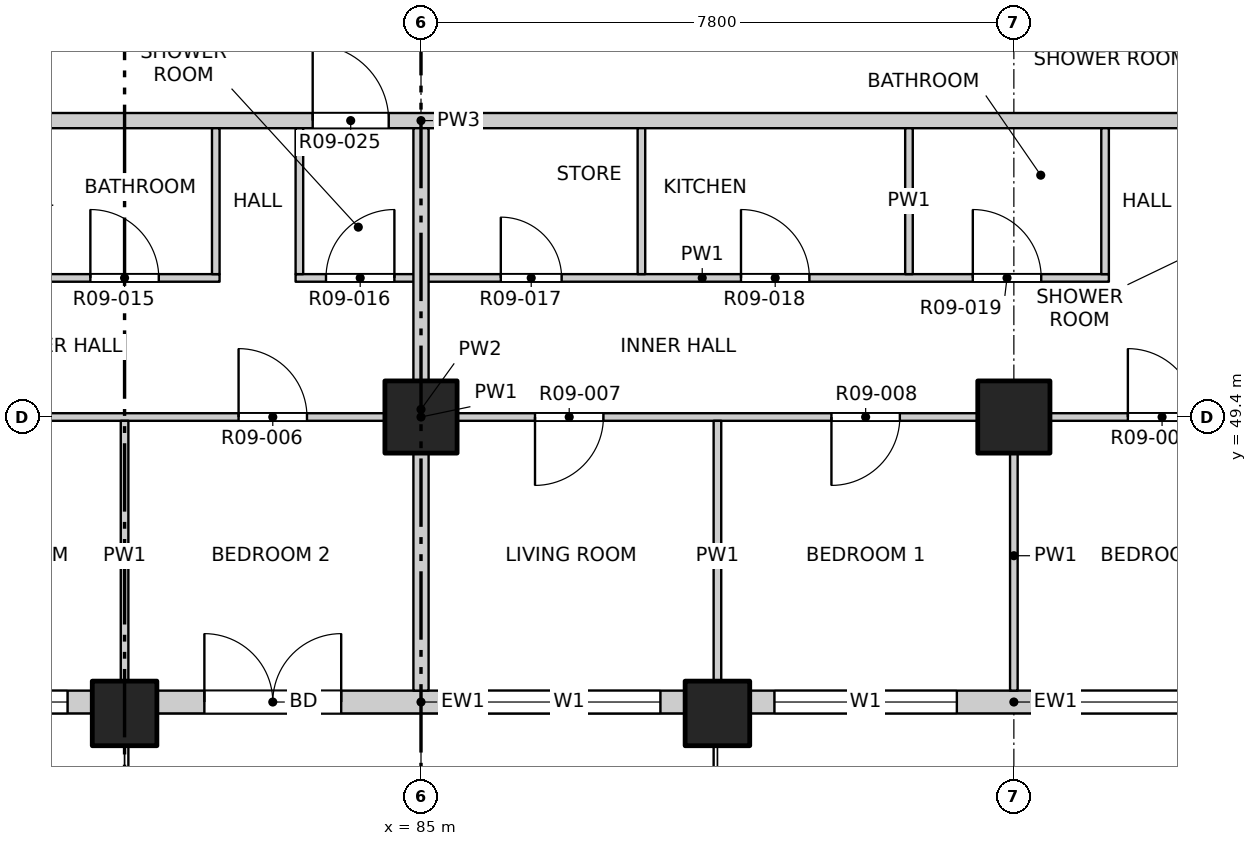
"""IFC4 building model, lengths in metres.
Left out: names, types, materials, properties, quantities, classifications, styles, units other than length and angle.
Written with IfcOpenShell. Run it as: python <this file> out.ifc"""

import sys

from ifc_helpers import new_model, si_unit, direction, frame, frame_2d, origin, origin_2d, place, context, subcontext, project, spatial, rectangle, extrude, element, fill, save


model = new_model("IFC4")
c1 = context("Model", 3, precision=1e-05, world=origin(), true_north=direction((0.0, 1.0)))
c2 = subcontext(c1, "Body", "Model", "MODEL_VIEW")
j1 = project(units=[si_unit("LENGTHUNIT", "METRE"), si_unit("PLANEANGLEUNIT", "RADIAN")], contexts=[c1])
p1 = place(None, origin())
s1 = spatial("IfcSite", under=j1, at=p1, CompositionType="ELEMENT")
p2 = place(p1, origin())
s2 = spatial("IfcBuilding", under=s1, at=p2, CompositionType="ELEMENT")
p3 = place(p2, frame((0.0, 0.0, 110.1)))
s3 = spatial("IfcBuildingStorey", under=s2, at=p3, CompositionType="ELEMENT", Elevation=110.1)
for number, where, z_axis, x_axis in (
    (1, (81.1, 45.5, -0.25), (0.0, 0.0, 1.0), (1.0, 0.0, 0.0)),
    (2, (88.9, 45.5, -0.25), (0.0, 0.0, 1.0), (1.0, 0.0, 0.0)),
):
    element("IfcColumn", number, at=place(p3, frame(where, z_axis=z_axis, x_axis=x_axis)), inside=s3, PredefinedType="COLUMN", context=c2, shape_type="SweptSolid", body=[
        extrude(rectangle(XDim=0.85, YDim=0.85, at=origin_2d()), origin(), (0.0, 0.0, 1.0), 3.4),
    ])
for number, where, z_axis, x_axis in (
    (3, (85.0, 49.4, -0.25), (0.0, 0.0, 1.0), (1.0, 0.0, 0.0)),
    (4, (92.8, 49.4, -0.25), (0.0, 0.0, 1.0), (1.0, 0.0, 0.0)),
):
    element("IfcColumn", number, at=place(p3, frame(where, z_axis=z_axis, x_axis=x_axis)), inside=s3, PredefinedType="COLUMN", context=c2, shape_type="SweptSolid", body=[
        extrude(rectangle(XDim=0.95, YDim=0.95, at=origin_2d()), origin(), (0.0, 0.0, 1.0), 3.4),
    ])
p4 = place(p3, frame((73.725, 45.65, 0.0), z_axis=(0.0, 0.0, 1.0), x_axis=(1.0, 0.0, 0.0)))
e5 = element("IfcWall", 5, at=p4, inside=s3, PredefinedType="SOLIDWALL", context=c2, shape_type="SweptSolid", body=[
    extrude(rectangle(XDim=6.95, YDim=0.3, at=frame_2d((3.475, 0.0))), origin(), (0.0, 0.0, 1.0), 2.7),
])
p5 = place(p4, frame((0.325, 0.0, 0.9)))
e6 = element("IfcOpeningElement", 6, at=p5, cuts=e5, PredefinedType="OPENING", context=c2, shape_type="SweptSolid", body=[
    extrude(rectangle(XDim=2.4, YDim=1.8, at=frame_2d((1.2, 0.9))), frame((0.0, 0.16, 0.0), z_axis=(0.0, -1.0, 0.0), x_axis=(1.0, 0.0, 0.0)), (0.0, 0.0, 1.0), 0.32),
])
p6 = place(p4, frame((4.225, 0.0, 0.9)))
e7 = element("IfcOpeningElement", 7, at=p6, cuts=e5, PredefinedType="OPENING", context=c2, shape_type="SweptSolid", body=[
    extrude(rectangle(XDim=2.4, YDim=1.8, at=frame_2d((1.2, 0.9))), frame((0.0, 0.16, 0.0), z_axis=(0.0, -1.0, 0.0), x_axis=(1.0, 0.0, 0.0)), (0.0, 0.0, 1.0), 0.32),
])
p7 = place(p3, frame((81.525, 45.65, 0.0), z_axis=(0.0, 0.0, 1.0), x_axis=(1.0, 0.0, 0.0)))
e8 = element("IfcWall", 8, at=p7, inside=s3, PredefinedType="SOLIDWALL", context=c2, shape_type="SweptSolid", body=[
    extrude(rectangle(XDim=6.95, YDim=0.3, at=frame_2d((3.475, 0.0))), origin(), (0.0, 0.0, 1.0), 2.7),
])
p8 = place(p7, frame((0.625, 0.0, 0.0)))
e9 = element("IfcOpeningElement", 9, at=p8, cuts=e8, PredefinedType="OPENING", context=c2, shape_type="SweptSolid", body=[
    extrude(rectangle(XDim=1.8, YDim=2.4, at=frame_2d((0.9, 1.2))), frame((0.0, 0.16, 0.0), z_axis=(0.0, -1.0, 0.0), x_axis=(1.0, 0.0, 0.0)), (0.0, 0.0, 1.0), 0.32),
])
p9 = place(p7, frame((4.225, 0.0, 0.9)))
e10 = element("IfcOpeningElement", 10, at=p9, cuts=e8, PredefinedType="OPENING", context=c2, shape_type="SweptSolid", body=[
    extrude(rectangle(XDim=2.4, YDim=1.8, at=frame_2d((1.2, 0.9))), frame((0.0, 0.16, 0.0), z_axis=(0.0, -1.0, 0.0), x_axis=(1.0, 0.0, 0.0)), (0.0, 0.0, 1.0), 0.32),
])
p10 = place(p3, frame((89.325, 45.65, 0.0), z_axis=(0.0, 0.0, 1.0), x_axis=(1.0, 0.0, 0.0)))
e11 = element("IfcWall", 11, at=p10, inside=s3, PredefinedType="SOLIDWALL", context=c2, shape_type="SweptSolid", body=[
    extrude(rectangle(XDim=6.95, YDim=0.3, at=frame_2d((3.475, 0.0))), origin(), (0.0, 0.0, 1.0), 2.7),
])
p11 = place(p10, frame((0.325, 0.0, 0.9)))
e12 = element("IfcOpeningElement", 12, at=p11, cuts=e11, PredefinedType="OPENING", context=c2, shape_type="SweptSolid", body=[
    extrude(rectangle(XDim=2.4, YDim=1.8, at=frame_2d((1.2, 0.9))), frame((0.0, 0.16, 0.0), z_axis=(0.0, -1.0, 0.0), x_axis=(1.0, 0.0, 0.0)), (0.0, 0.0, 1.0), 0.32),
])
p12 = place(p10, frame((4.225, 0.0, 0.9)))
e13 = element("IfcOpeningElement", 13, at=p12, cuts=e11, PredefinedType="OPENING", context=c2, shape_type="SweptSolid", body=[
    extrude(rectangle(XDim=2.4, YDim=1.8, at=frame_2d((1.2, 0.9))), frame((0.0, 0.16, 0.0), z_axis=(0.0, -1.0, 0.0), x_axis=(1.0, 0.0, 0.0)), (0.0, 0.0, 1.0), 0.32),
])
p13 = place(p3, frame((65.8, 49.4, 0.0), z_axis=(0.0, 0.0, 1.0), x_axis=(1.0, 0.0, 0.0)))
e14 = element("IfcWall", 14, at=p13, inside=s3, PredefinedType="PARTITIONING", context=c2, shape_type="SweptSolid", body=[
    extrude(rectangle(XDim=38.4, YDim=0.1, at=frame_2d((19.2, 0.0))), origin(), (0.0, 0.0, 1.0), 3.15),
])
p14 = place(p13, frame((4.19, 0.0, 0.0)))
e15 = element("IfcOpeningElement", 15, at=p14, cuts=e14, PredefinedType="OPENING", context=c2, shape_type="SweptSolid", body=[
    extrude(rectangle(XDim=0.9, YDim=2.1, at=frame_2d((0.45, 1.05))), frame((0.0, 0.06, 0.0), z_axis=(0.0, -1.0, 0.0), x_axis=(1.0, 0.0, 0.0)), (0.0, 0.0, 1.0), 0.12),
])
p15 = place(p13, frame((9.0, 0.0, 0.0)))
e16 = element("IfcOpeningElement", 16, at=p15, cuts=e14, PredefinedType="OPENING", context=c2, shape_type="SweptSolid", body=[
    extrude(rectangle(XDim=0.9, YDim=2.1, at=frame_2d((0.45, 1.05))), frame((0.0, 0.06, 0.0), z_axis=(0.0, -1.0, 0.0), x_axis=(1.0, 0.0, 0.0)), (0.0, 0.0, 1.0), 0.12),
])
p16 = place(p13, frame((12.9, 0.0, 0.0)))
e17 = element("IfcOpeningElement", 17, at=p16, cuts=e14, PredefinedType="OPENING", context=c2, shape_type="SweptSolid", body=[
    extrude(rectangle(XDim=0.9, YDim=2.1, at=frame_2d((0.45, 1.05))), frame((0.0, 0.06, 0.0), z_axis=(0.0, -1.0, 0.0), x_axis=(1.0, 0.0, 0.0)), (0.0, 0.0, 1.0), 0.12),
])
p17 = place(p13, frame((16.8, 0.0, 0.0)))
e18 = element("IfcOpeningElement", 18, at=p17, cuts=e14, PredefinedType="OPENING", context=c2, shape_type="SweptSolid", body=[
    extrude(rectangle(XDim=0.9, YDim=2.1, at=frame_2d((0.45, 1.05))), frame((0.0, 0.06, 0.0), z_axis=(0.0, -1.0, 0.0), x_axis=(1.0, 0.0, 0.0)), (0.0, 0.0, 1.0), 0.12),
])
p18 = place(p13, frame((20.7, 0.0, 0.0)))
e19 = element("IfcOpeningElement", 19, at=p18, cuts=e14, PredefinedType="OPENING", context=c2, shape_type="SweptSolid", body=[
    extrude(rectangle(XDim=0.9, YDim=2.1, at=frame_2d((0.45, 1.05))), frame((0.0, 0.06, 0.0), z_axis=(0.0, -1.0, 0.0), x_axis=(1.0, 0.0, 0.0)), (0.0, 0.0, 1.0), 0.12),
])
p19 = place(p13, frame((24.6, 0.0, 0.0)))
e20 = element("IfcOpeningElement", 20, at=p19, cuts=e14, PredefinedType="OPENING", context=c2, shape_type="SweptSolid", body=[
    extrude(rectangle(XDim=0.9, YDim=2.1, at=frame_2d((0.45, 1.05))), frame((0.0, 0.06, 0.0), z_axis=(0.0, -1.0, 0.0), x_axis=(1.0, 0.0, 0.0)), (0.0, 0.0, 1.0), 0.12),
])
p20 = place(p13, frame((28.5, 0.0, 0.0)))
e21 = element("IfcOpeningElement", 21, at=p20, cuts=e14, PredefinedType="OPENING", context=c2, shape_type="SweptSolid", body=[
    extrude(rectangle(XDim=0.9, YDim=2.1, at=frame_2d((0.45, 1.05))), frame((0.0, 0.06, 0.0), z_axis=(0.0, -1.0, 0.0), x_axis=(1.0, 0.0, 0.0)), (0.0, 0.0, 1.0), 0.12),
])
p21 = place(p13, frame((33.31, 0.0, 0.0)))
e22 = element("IfcOpeningElement", 22, at=p21, cuts=e14, PredefinedType="OPENING", context=c2, shape_type="SweptSolid", body=[
    extrude(rectangle(XDim=0.9, YDim=2.1, at=frame_2d((0.45, 1.05))), frame((0.0, 0.06, 0.0), z_axis=(0.0, -1.0, 0.0), x_axis=(1.0, 0.0, 0.0)), (0.0, 0.0, 1.0), 0.12),
])
p22 = place(p3, frame((73.2, 51.23, 0.0), z_axis=(0.0, 0.0, 1.0), x_axis=(1.0, 0.0, 0.0)))
e23 = element("IfcWall", 23, at=p22, inside=s3, PredefinedType="PARTITIONING", context=c2, shape_type="SweptSolid", body=[
    extrude(rectangle(XDim=9.15, YDim=0.1, at=frame_2d((4.575, 0.0))), origin(), (0.0, 0.0, 1.0), 3.15),
])
p23 = place(p22, frame((1.41, 0.0, 0.0)))
e24 = element("IfcOpeningElement", 24, at=p23, cuts=e23, PredefinedType="OPENING", context=c2, shape_type="SweptSolid", body=[
    extrude(rectangle(XDim=0.9, YDim=2.1, at=frame_2d((0.45, 1.05))), frame((0.0, 0.06, 0.0), z_axis=(0.0, -1.0, 0.0), x_axis=(1.0, 0.0, 0.0)), (0.0, 0.0, 1.0), 0.12),
])
p24 = place(p22, frame((4.76, 0.0, 0.0)))
e25 = element("IfcOpeningElement", 25, at=p24, cuts=e23, PredefinedType="OPENING", context=c2, shape_type="SweptSolid", body=[
    extrude(rectangle(XDim=0.8, YDim=2.1, at=frame_2d((0.4, 1.05))), frame((0.0, 0.06, 0.0), z_axis=(0.0, -1.0, 0.0), x_axis=(1.0, 0.0, 0.0)), (0.0, 0.0, 1.0), 0.12),
])
p25 = place(p22, frame((7.45, 0.0, 0.0)))
e26 = element("IfcOpeningElement", 26, at=p25, cuts=e23, PredefinedType="OPENING", context=c2, shape_type="SweptSolid", body=[
    extrude(rectangle(XDim=0.9, YDim=2.1, at=frame_2d((0.45, 1.05))), frame((0.0, 0.06, 0.0), z_axis=(0.0, -1.0, 0.0), x_axis=(1.0, 0.0, 0.0)), (0.0, 0.0, 1.0), 0.12),
])
p26 = place(p3, frame((83.35, 51.23, 0.0), z_axis=(0.0, 0.0, 1.0), x_axis=(1.0, 0.0, 0.0)))
e27 = element("IfcWall", 27, at=p26, inside=s3, PredefinedType="PARTITIONING", context=c2, shape_type="SweptSolid", body=[
    extrude(rectangle(XDim=10.7, YDim=0.1, at=frame_2d((5.35, 0.0))), origin(), (0.0, 0.0, 1.0), 3.15),
])
p27 = place(p26, frame((0.4, 0.0, 0.0)))
e28 = element("IfcOpeningElement", 28, at=p27, cuts=e27, PredefinedType="OPENING", context=c2, shape_type="SweptSolid", body=[
    extrude(rectangle(XDim=0.9, YDim=2.1, at=frame_2d((0.45, 1.05))), frame((0.0, 0.06, 0.0), z_axis=(0.0, -1.0, 0.0), x_axis=(1.0, 0.0, 0.0)), (0.0, 0.0, 1.0), 0.12),
])
p28 = place(p26, frame((2.7, 0.0, 0.0)))
e29 = element("IfcOpeningElement", 29, at=p28, cuts=e27, PredefinedType="OPENING", context=c2, shape_type="SweptSolid", body=[
    extrude(rectangle(XDim=0.8, YDim=2.1, at=frame_2d((0.4, 1.05))), frame((0.0, 0.06, 0.0), z_axis=(0.0, -1.0, 0.0), x_axis=(1.0, 0.0, 0.0)), (0.0, 0.0, 1.0), 0.12),
])
p29 = place(p26, frame((5.86, 0.0, 0.0)))
e30 = element("IfcOpeningElement", 30, at=p29, cuts=e27, PredefinedType="OPENING", context=c2, shape_type="SweptSolid", body=[
    extrude(rectangle(XDim=0.9, YDim=2.1, at=frame_2d((0.45, 1.05))), frame((0.0, 0.06, 0.0), z_axis=(0.0, -1.0, 0.0), x_axis=(1.0, 0.0, 0.0)), (0.0, 0.0, 1.0), 0.12),
])
p30 = place(p26, frame((8.91, 0.0, 0.0)))
e31 = element("IfcOpeningElement", 31, at=p30, cuts=e27, PredefinedType="OPENING", context=c2, shape_type="SweptSolid", body=[
    extrude(rectangle(XDim=0.9, YDim=2.1, at=frame_2d((0.45, 1.05))), frame((0.0, 0.06, 0.0), z_axis=(0.0, -1.0, 0.0), x_axis=(1.0, 0.0, 0.0)), (0.0, 0.0, 1.0), 0.12),
])
p31 = place(p3, frame((73.2, 53.3, 0.0), z_axis=(0.0, 0.0, 1.0), x_axis=(1.0, 0.0, 0.0)))
e32 = element("IfcWall", 32, at=p31, inside=s3, PredefinedType="PARTITIONING", context=c2, shape_type="SweptSolid", body=[
    extrude(rectangle(XDim=23.6, YDim=0.2, at=frame_2d((11.8, 0.0))), origin(), (0.0, 0.0, 1.0), 3.15),
])
p32 = place(p31, frame((10.375, 0.0, 0.0)))
e33 = element("IfcOpeningElement", 33, at=p32, cuts=e32, PredefinedType="OPENING", context=c2, shape_type="SweptSolid", body=[
    extrude(rectangle(XDim=1.0, YDim=2.1, at=frame_2d((0.5, 1.05))), frame((0.0, 0.11, 0.0), z_axis=(0.0, -1.0, 0.0), x_axis=(1.0, 0.0, 0.0)), (0.0, 0.0, 1.0), 0.22),
])
p33 = place(p31, frame((22.075, 0.0, 0.0)))
e34 = element("IfcOpeningElement", 34, at=p33, cuts=e32, PredefinedType="OPENING", context=c2, shape_type="SweptSolid", body=[
    extrude(rectangle(XDim=1.0, YDim=2.1, at=frame_2d((0.5, 1.05))), frame((0.0, 0.11, 0.0), z_axis=(0.0, -1.0, 0.0), x_axis=(1.0, 0.0, 0.0)), (0.0, 0.0, 1.0), 0.22),
])
p34 = place(p3, frame((81.1, 45.8, 0.0), z_axis=(0.0, 0.0, 1.0), x_axis=(0.0, 1.0, 0.0)))
e35 = element("IfcWall", 35, at=p34, inside=s3, PredefinedType="PARTITIONING", context=c2, shape_type="SweptSolid", body=[
    extrude(rectangle(XDim=3.55, YDim=0.1, at=frame_2d((1.775, 0.0))), origin(), (0.0, 0.0, 1.0), 2.55),
])
for number, where, z_axis, x_axis in (
    (36, (82.3, 51.28, 0.0), (0.0, 0.0, 1.0), (0.0, 1.0, 0.0)),
    (37, (83.4, 51.28, 0.0), (0.0, 0.0, 1.0), (0.0, 1.0, 0.0)),
):
    element("IfcWall", number, at=place(p3, frame(where, z_axis=z_axis, x_axis=x_axis)), inside=s3, PredefinedType="PARTITIONING", context=c2, shape_type="SweptSolid", body=[
        extrude(rectangle(XDim=1.92, YDim=0.1, at=frame_2d((0.96, 0.0))), origin(), (0.0, 0.0, 1.0), 3.15),
    ])
p35 = place(p3, frame((85.0, 45.8, 0.0), z_axis=(0.0, 0.0, 1.0), x_axis=(0.0, 1.0, 0.0)))
e38 = element("IfcWall", 38, at=p35, inside=s3, PredefinedType="PARTITIONING", context=c2, shape_type="SweptSolid", body=[
    extrude(rectangle(XDim=7.4, YDim=0.2, at=frame_2d((3.7, 0.0))), origin(), (0.0, 0.0, 1.0), 3.15),
])
p36 = place(p3, frame((87.9, 51.28, 0.0), z_axis=(0.0, 0.0, 1.0), x_axis=(0.0, 1.0, 0.0)))
e39 = element("IfcWall", 39, at=p36, inside=s3, PredefinedType="PARTITIONING", context=c2, shape_type="SweptSolid", body=[
    extrude(rectangle(XDim=1.92, YDim=0.1, at=frame_2d((0.96, 0.0))), origin(), (0.0, 0.0, 1.0), 3.15),
])
p37 = place(p3, frame((88.9, 45.8, 0.0), z_axis=(0.0, 0.0, 1.0), x_axis=(0.0, 1.0, 0.0)))
e40 = element("IfcWall", 40, at=p37, inside=s3, PredefinedType="PARTITIONING", context=c2, shape_type="SweptSolid", body=[
    extrude(rectangle(XDim=3.55, YDim=0.1, at=frame_2d((1.775, 0.0))), origin(), (0.0, 0.0, 1.0), 2.55),
])
p38 = place(p3, frame((91.42, 51.28, 0.0), z_axis=(0.0, 0.0, 1.0), x_axis=(0.0, 1.0, 0.0)))
e41 = element("IfcWall", 41, at=p38, inside=s3, PredefinedType="PARTITIONING", context=c2, shape_type="SweptSolid", body=[
    extrude(rectangle(XDim=1.92, YDim=0.1, at=frame_2d((0.96, 0.0))), origin(), (0.0, 0.0, 1.0), 3.15),
])
p39 = place(p3, frame((92.8, 45.8, 0.0), z_axis=(0.0, 0.0, 1.0), x_axis=(0.0, 1.0, 0.0)))
e42 = element("IfcWall", 42, at=p39, inside=s3, PredefinedType="PARTITIONING", context=c2, shape_type="SweptSolid", body=[
    extrude(rectangle(XDim=3.55, YDim=0.1, at=frame_2d((1.775, 0.0))), origin(), (0.0, 0.0, 1.0), 3.15),
])
p40 = place(p3, frame((94.0, 51.28, 0.0), z_axis=(0.0, 0.0, 1.0), x_axis=(0.0, 1.0, 0.0)))
e43 = element("IfcWall", 43, at=p40, inside=s3, PredefinedType="PARTITIONING", context=c2, shape_type="SweptSolid", body=[
    extrude(rectangle(XDim=1.92, YDim=0.1, at=frame_2d((0.96, 0.0))), origin(), (0.0, 0.0, 1.0), 3.15),
])
p41 = place(p6, origin())
e44 = element("IfcWindow", 44, at=p41, inside=s3, PartitioningType="DOUBLE_PANEL_VERTICAL", PredefinedType="WINDOW", context=c2, shape_type="SweptSolid", body=[
    extrude(rectangle(XDim=2.4, YDim=1.8, at=frame_2d((1.2, 0.9))), frame((0.0, 0.03, 0.0), z_axis=(0.0, -1.0, 0.0), x_axis=(1.0, 0.0, 0.0)), (0.0, 0.0, 1.0), 0.06),
])
fill(e7, e44)
p42 = place(p8, origin())
e45 = element("IfcDoor", 45, at=p42, inside=s3, OperationType="DOUBLE_DOOR_SINGLE_SWING", PredefinedType="DOOR", context=c2, shape_type="SweptSolid", body=[
    extrude(rectangle(XDim=1.8, YDim=2.4, at=frame_2d((0.9, 1.2))), frame((0.0, 0.025, 0.0), z_axis=(0.0, -1.0, 0.0), x_axis=(1.0, 0.0, 0.0)), (0.0, 0.0, 1.0), 0.05),
])
fill(e9, e45)
p43 = place(p9, origin())
e46 = element("IfcWindow", 46, at=p43, inside=s3, PartitioningType="DOUBLE_PANEL_VERTICAL", PredefinedType="WINDOW", context=c2, shape_type="SweptSolid", body=[
    extrude(rectangle(XDim=2.4, YDim=1.8, at=frame_2d((1.2, 0.9))), frame((0.0, 0.03, 0.0), z_axis=(0.0, -1.0, 0.0), x_axis=(1.0, 0.0, 0.0)), (0.0, 0.0, 1.0), 0.06),
])
fill(e10, e46)
p44 = place(p11, origin())
e47 = element("IfcWindow", 47, at=p44, inside=s3, PartitioningType="DOUBLE_PANEL_VERTICAL", PredefinedType="WINDOW", context=c2, shape_type="SweptSolid", body=[
    extrude(rectangle(XDim=2.4, YDim=1.8, at=frame_2d((1.2, 0.9))), frame((0.0, 0.03, 0.0), z_axis=(0.0, -1.0, 0.0), x_axis=(1.0, 0.0, 0.0)), (0.0, 0.0, 1.0), 0.06),
])
fill(e12, e47)
p45 = place(p12, origin())
e48 = element("IfcWindow", 48, at=p45, inside=s3, PartitioningType="DOUBLE_PANEL_VERTICAL", PredefinedType="WINDOW", context=c2, shape_type="SweptSolid", body=[
    extrude(rectangle(XDim=2.4, YDim=1.8, at=frame_2d((1.2, 0.9))), frame((0.0, 0.03, 0.0), z_axis=(0.0, -1.0, 0.0), x_axis=(1.0, 0.0, 0.0)), (0.0, 0.0, 1.0), 0.06),
])
fill(e13, e48)
p46 = place(p17, origin())
e49 = element("IfcDoor", 49, at=p46, inside=s3, OperationType="SINGLE_SWING_LEFT", PredefinedType="DOOR", context=c2, shape_type="SweptSolid", body=[
    extrude(rectangle(XDim=0.9, YDim=2.1, at=frame_2d((0.45, 1.05))), frame((0.0, 0.025, 0.0), z_axis=(0.0, -1.0, 0.0), x_axis=(1.0, 0.0, 0.0)), (0.0, 0.0, 1.0), 0.05),
])
fill(e18, e49)
p47 = place(p18, origin())
e50 = element("IfcDoor", 50, at=p47, inside=s3, OperationType="SINGLE_SWING_RIGHT", PredefinedType="DOOR", context=c2, shape_type="SweptSolid", body=[
    extrude(rectangle(XDim=0.9, YDim=2.1, at=frame_2d((0.45, 1.05))), frame((0.0, 0.025, 0.0), z_axis=(0.0, -1.0, 0.0), x_axis=(1.0, 0.0, 0.0)), (0.0, 0.0, 1.0), 0.05),
])
fill(e19, e50)
p48 = place(p19, origin())
e51 = element("IfcDoor", 51, at=p48, inside=s3, OperationType="SINGLE_SWING_RIGHT", PredefinedType="DOOR", context=c2, shape_type="SweptSolid", body=[
    extrude(rectangle(XDim=0.9, YDim=2.1, at=frame_2d((0.45, 1.05))), frame((0.0, 0.025, 0.0), z_axis=(0.0, -1.0, 0.0), x_axis=(1.0, 0.0, 0.0)), (0.0, 0.0, 1.0), 0.05),
])
fill(e20, e51)
p49 = place(p20, origin())
e52 = element("IfcDoor", 52, at=p49, inside=s3, OperationType="SINGLE_SWING_LEFT", PredefinedType="DOOR", context=c2, shape_type="SweptSolid", body=[
    extrude(rectangle(XDim=0.9, YDim=2.1, at=frame_2d((0.45, 1.05))), frame((0.0, 0.025, 0.0), z_axis=(0.0, -1.0, 0.0), x_axis=(1.0, 0.0, 0.0)), (0.0, 0.0, 1.0), 0.05),
])
fill(e21, e52)
p50 = place(p25, origin())
e53 = element("IfcDoor", 53, at=p50, inside=s3, OperationType="SINGLE_SWING_LEFT", PredefinedType="DOOR", context=c2, shape_type="SweptSolid", body=[
    extrude(rectangle(XDim=0.9, YDim=2.1, at=frame_2d((0.45, 1.05))), frame((0.0, 0.025, 0.0), z_axis=(0.0, -1.0, 0.0), x_axis=(1.0, 0.0, 0.0)), (0.0, 0.0, 1.0), 0.05),
])
fill(e26, e53)
p51 = place(p27, origin())
e54 = element("IfcDoor", 54, at=p51, inside=s3, OperationType="SINGLE_SWING_RIGHT", PredefinedType="DOOR", context=c2, shape_type="SweptSolid", body=[
    extrude(rectangle(XDim=0.9, YDim=2.1, at=frame_2d((0.45, 1.05))), frame((0.0, 0.025, 0.0), z_axis=(0.0, -1.0, 0.0), x_axis=(1.0, 0.0, 0.0)), (0.0, 0.0, 1.0), 0.05),
])
fill(e28, e54)
p52 = place(p28, origin())
e55 = element("IfcDoor", 55, at=p52, inside=s3, OperationType="SINGLE_SWING_LEFT", PredefinedType="DOOR", context=c2, shape_type="SweptSolid", body=[
    extrude(rectangle(XDim=0.8, YDim=2.1, at=frame_2d((0.4, 1.05))), frame((0.0, 0.025, 0.0), z_axis=(0.0, -1.0, 0.0), x_axis=(1.0, 0.0, 0.0)), (0.0, 0.0, 1.0), 0.05),
])
fill(e29, e55)
p53 = place(p29, origin())
e56 = element("IfcDoor", 56, at=p53, inside=s3, OperationType="SINGLE_SWING_LEFT", PredefinedType="DOOR", context=c2, shape_type="SweptSolid", body=[
    extrude(rectangle(XDim=0.9, YDim=2.1, at=frame_2d((0.45, 1.05))), frame((0.0, 0.025, 0.0), z_axis=(0.0, -1.0, 0.0), x_axis=(1.0, 0.0, 0.0)), (0.0, 0.0, 1.0), 0.05),
])
fill(e30, e56)
p54 = place(p30, origin())
e57 = element("IfcDoor", 57, at=p54, inside=s3, OperationType="SINGLE_SWING_LEFT", PredefinedType="DOOR", context=c2, shape_type="SweptSolid", body=[
    extrude(rectangle(XDim=0.9, YDim=2.1, at=frame_2d((0.45, 1.05))), frame((0.0, 0.025, 0.0), z_axis=(0.0, -1.0, 0.0), x_axis=(1.0, 0.0, 0.0)), (0.0, 0.0, 1.0), 0.05),
])
fill(e31, e57)
p55 = place(p32, origin())
e58 = element("IfcDoor", 58, at=p55, inside=s3, OperationType="SINGLE_SWING_LEFT", PredefinedType="DOOR", context=c2, shape_type="SweptSolid", body=[
    extrude(rectangle(XDim=1.0, YDim=2.1, at=frame_2d((0.5, 1.05))), frame((0.0, 0.025, 0.0), z_axis=(0.0, -1.0, 0.0), x_axis=(1.0, 0.0, 0.0)), (0.0, 0.0, 1.0), 0.05),
])
fill(e33, e58)
save(model, sys.argv[1])
